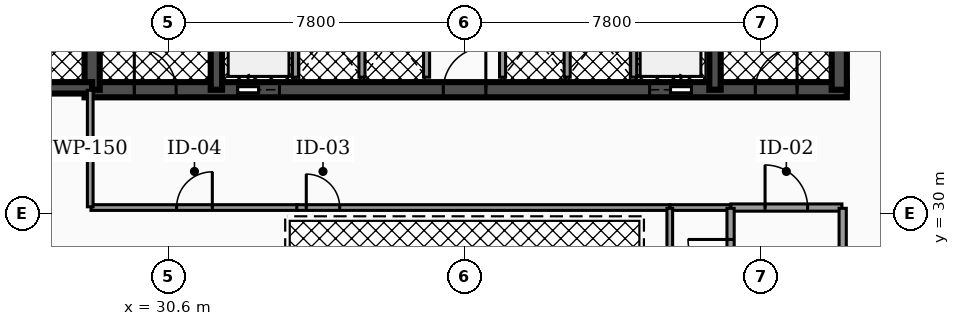
"""IFC4 building model, lengths in metres.
Left out: names, types, materials, properties, quantities, classifications, styles, units other than length and angle.
Written with IfcOpenShell. Run it as: python <this file> out.ifc"""

import sys

from ifc_helpers import new_model, si_unit, direction, frame, frame_2d, origin, place, context, subcontext, project, spatial, rectangle, extrude, element, fill, save


model = new_model("IFC4")
c1 = context("Model", 3, precision=1e-05, world=origin(), true_north=direction((0.0, 1.0)))
c2 = subcontext(c1, "Body", "Model", "MODEL_VIEW")
j1 = project(units=[si_unit("LENGTHUNIT", "METRE"), si_unit("PLANEANGLEUNIT", "RADIAN")], contexts=[c1])
p1 = place(None, origin())
s1 = spatial("IfcSite", under=j1, at=p1, CompositionType="ELEMENT")
p2 = place(p1, origin())
s2 = spatial("IfcBuilding", under=s1, at=p2, CompositionType="ELEMENT")
p3 = place(p2, frame((0.0, 0.0, 100.98)))
s3 = spatial("IfcBuildingStorey", under=s2, at=p3, CompositionType="ELEMENT", Elevation=100.98)
p4 = place(p3, frame((28.4, 33.25, 0.0), z_axis=(0.0, 0.0, 1.0), x_axis=(1.0, 0.0, 0.0)))
e1 = element("IfcWall", 1, at=p4, inside=s3, PredefinedType="SHEAR", context=c2, shape_type="SweptSolid", body=[
    extrude(rectangle(XDim=20.06, YDim=0.4, at=frame_2d((10.03, 0.0))), origin(), (0.0, 0.0, 1.0), 3.82),
])
p5 = place(p4, frame((4.03, 0.0, 0.0)))
e2 = element("IfcOpeningElement", 2, at=p5, cuts=e1, PredefinedType="OPENING", context=c2, shape_type="SweptSolid", body=[
    extrude(rectangle(XDim=1.1, YDim=2.15, at=frame_2d((0.55, 1.075))), frame((0.0, 0.21, 0.0), z_axis=(0.0, -1.0, 0.0), x_axis=(1.0, 0.0, 0.0)), (0.0, 0.0, 1.0), 0.42),
])
p6 = place(p4, frame((14.87, 0.0, 0.0)))
e3 = element("IfcOpeningElement", 3, at=p6, cuts=e1, PredefinedType="OPENING", context=c2, shape_type="SweptSolid", body=[
    extrude(rectangle(XDim=1.1, YDim=2.15, at=frame_2d((0.55, 1.075))), frame((0.0, 0.21, 0.0), z_axis=(0.0, -1.0, 0.0), x_axis=(1.0, 0.0, 0.0)), (0.0, 0.0, 1.0), 0.42),
])
p7 = place(p4, frame((1.31, 0.0, 0.0)))
e4 = element("IfcOpeningElement", 4, at=p7, cuts=e1, PredefinedType="OPENING", context=c2, shape_type="SweptSolid", body=[
    extrude(rectangle(XDim=1.1, YDim=2.2, at=frame_2d((0.55, 1.1))), frame((0.0, 0.21, 0.0), z_axis=(0.0, -1.0, 0.0), x_axis=(1.0, 0.0, 0.0)), (0.0, 0.0, 1.0), 0.42),
])
p8 = place(p4, frame((9.44, 0.0, 0.0)))
e5 = element("IfcOpeningElement", 5, at=p8, cuts=e1, PredefinedType="OPENING", context=c2, shape_type="SweptSolid", body=[
    extrude(rectangle(XDim=1.12, YDim=2.05, at=frame_2d((0.56, 1.025))), frame((0.0, 0.21, 0.0), z_axis=(0.0, -1.0, 0.0), x_axis=(1.0, 0.0, 0.0)), (0.0, 0.0, 1.0), 0.42),
])
p9 = place(p4, frame((17.65, 0.0, 0.0)))
e6 = element("IfcOpeningElement", 6, at=p9, cuts=e1, PredefinedType="OPENING", context=c2, shape_type="SweptSolid", body=[
    extrude(rectangle(XDim=1.1, YDim=2.2, at=frame_2d((0.55, 1.1))), frame((0.0, 0.21, 0.0), z_axis=(0.0, -1.0, 0.0), x_axis=(1.0, 0.0, 0.0)), (0.0, 0.0, 1.0), 0.42),
])
p10 = place(p3, frame((28.6, 33.25, 0.0), z_axis=(0.0, 0.0, 1.0), x_axis=(0.0, 1.0, 0.0)))
e7 = element("IfcWall", 7, at=p10, inside=s3, PredefinedType="SHEAR", context=c2, shape_type="SweptSolid", body=[
    extrude(rectangle(XDim=10.2, YDim=0.4, at=frame_2d((5.1, 0.0))), origin(), (0.0, 0.0, 1.0), 3.82),
])
for number, where, z_axis, x_axis in (
    (8, (31.87, 33.25, 0.0), (0.0, 0.0, 1.0), (0.0, 1.0, 0.0)),
    (9, (44.99, 33.25, 0.0), (0.0, 0.0, 1.0), (0.0, 1.0, 0.0)),
):
    element("IfcWall", number, at=place(p3, frame(where, z_axis=z_axis, x_axis=x_axis)), inside=s3, PredefinedType="SHEAR", context=c2, shape_type="SweptSolid", body=[
        extrude(rectangle(XDim=10.2, YDim=0.3, at=frame_2d((5.1, 0.0))), origin(), (0.0, 0.0, 1.0), 3.82),
    ])
p11 = place(p3, frame((48.26, 33.25, 0.0), z_axis=(0.0, 0.0, 1.0), x_axis=(0.0, 1.0, 0.0)))
e10 = element("IfcWall", 10, at=p11, inside=s3, PredefinedType="SHEAR", context=c2, shape_type="SweptSolid", body=[
    extrude(rectangle(XDim=10.2, YDim=0.4, at=frame_2d((5.1, 0.0))), origin(), (0.0, 0.0, 1.0), 3.82),
])
p12 = place(p3, frame((25.08, 33.3, 0.0), z_axis=(0.0, 0.0, 1.0), x_axis=(1.0, 0.0, 0.0)))
e11 = element("IfcWall", 11, at=p12, inside=s3, PredefinedType="SHEAR", context=c2, shape_type="SweptSolid", body=[
    extrude(rectangle(XDim=3.52, YDim=0.3, at=frame_2d((1.76, 0.0))), origin(), (0.0, 0.0, 1.0), 3.82),
])
p13 = place(p12, frame((1.335, 0.0, 0.0)))
e12 = element("IfcOpeningElement", 12, at=p13, cuts=e11, PredefinedType="OPENING", context=c2, shape_type="SweptSolid", body=[
    extrude(rectangle(XDim=0.95, YDim=2.2, at=frame_2d((0.475, 1.1))), frame((0.0, 0.16, 0.0), z_axis=(0.0, -1.0, 0.0), x_axis=(1.0, 0.0, 0.0)), (0.0, 0.0, 1.0), 0.32),
])
for number, where, z_axis, x_axis in (
    (13, (33.95, 33.58, 0.0), (0.0, 0.0, 1.0), (0.0, 1.0, 0.0)),
    (14, (42.85, 33.58, 0.0), (0.0, 0.0, 1.0), (0.0, 1.0, 0.0)),
):
    element("IfcWall", number, at=place(p3, frame(where, z_axis=z_axis, x_axis=x_axis)), inside=s3, PredefinedType="SOLIDWALL", context=c2, shape_type="SweptSolid", body=[
        extrude(rectangle(XDim=2.45, YDim=0.16, at=frame_2d((1.225, 0.0))), origin(), (0.0, 0.0, 1.0), 2.792),
    ])
for number, where, z_axis, x_axis in (
    (15, (35.7, 33.58, 0.0), (0.0, 0.0, 1.0), (0.0, 1.0, 0.0)),
    (16, (37.4, 33.58, 0.0), (0.0, 0.0, 1.0), (0.0, 1.0, 0.0)),
    (17, (39.4, 33.58, 0.0), (0.0, 0.0, 1.0), (0.0, 1.0, 0.0)),
    (18, (41.1, 33.58, 0.0), (0.0, 0.0, 1.0), (0.0, 1.0, 0.0)),
):
    element("IfcWall", number, at=place(p3, frame(where, z_axis=z_axis, x_axis=x_axis)), inside=s3, PredefinedType="SOLIDWALL", context=c2, shape_type="SweptSolid", body=[
        extrude(rectangle(XDim=2.25, YDim=0.16, at=frame_2d((1.125, 0.0))), origin(), (0.0, 0.0, 1.0), 2.792),
    ])
p14 = place(p3, frame((45.405, 30.15, 0.0), z_axis=(0.0, 0.0, 1.0), x_axis=(1.0, 0.0, 0.0)))
e19 = element("IfcWall", 19, at=p14, inside=s3, PredefinedType="PARTITIONING", context=c2, shape_type="SweptSolid", body=[
    extrude(rectangle(XDim=2.925, YDim=0.19, at=frame_2d((1.462, 0.0))), origin(), (0.0, 0.0, 1.0), 2.777),
])
p15 = place(p14, frame((0.903, 0.0, 0.0)))
e20 = element("IfcOpeningElement", 20, at=p15, cuts=e19, PredefinedType="OPENING", context=c2, shape_type="SweptSolid", body=[
    extrude(rectangle(XDim=1.12, YDim=2.05, at=frame_2d((0.56, 1.025))), frame((0.0, 0.105, 0.0), z_axis=(0.0, -1.0, 0.0), x_axis=(1.0, 0.0, 0.0)), (0.0, 0.0, 1.0), 0.21),
])
p16 = place(p3, frame((43.805, 30.15, 0.0), z_axis=(0.0, 0.0, 1.0), x_axis=(1.0, 0.0, 0.0)))
e21 = element("IfcWall", 21, at=p16, inside=s3, PredefinedType="PARTITIONING", context=c2, shape_type="SweptSolid", body=[
    extrude(rectangle(XDim=1.59, YDim=0.15, at=frame_2d((0.795, 0.0))), origin(), (0.0, 0.0, 1.0), 2.777),
])
p17 = place(p3, frame((28.57, 30.15, 0.0), z_axis=(0.0, 0.0, 1.0), x_axis=(1.0, 0.0, 0.0)))
e22 = element("IfcWall", 22, at=p17, inside=s3, PredefinedType="PARTITIONING", context=c2, shape_type="SweptSolid", body=[
    extrude(rectangle(XDim=5.445, YDim=0.15, at=frame_2d((2.722, 0.0))), origin(), (0.0, 0.0, 1.0), 2.777),
])
p18 = place(p17, frame((2.252, 0.0, 0.0)))
e23 = element("IfcOpeningElement", 23, at=p18, cuts=e22, PredefinedType="OPENING", context=c2, shape_type="SweptSolid", body=[
    extrude(rectangle(XDim=0.94, YDim=2.05, at=frame_2d((0.47, 1.025))), frame((0.0, 0.085, 0.0), z_axis=(0.0, -1.0, 0.0), x_axis=(1.0, 0.0, 0.0)), (0.0, 0.0, 1.0), 0.17),
])
p19 = place(p3, frame((28.55, 30.17, 0.0), z_axis=(0.0, 0.0, 1.0), x_axis=(0.0, 1.0, 0.0)))
e24 = element("IfcWall", 24, at=p19, inside=s3, PredefinedType="PARTITIONING", context=c2, shape_type="SweptSolid", body=[
    extrude(rectangle(XDim=3.065, YDim=0.15, at=frame_2d((1.533, 0.0))), origin(), (0.0, 0.0, 1.0), 2.777),
])
p20 = place(p3, frame((33.985, 30.15, 0.0), z_axis=(0.0, 0.0, 1.0), x_axis=(1.0, 0.0, 0.0)))
e25 = element("IfcWall", 25, at=p20, inside=s3, PredefinedType="PARTITIONING", context=c2, shape_type="SweptSolid", body=[
    extrude(rectangle(XDim=9.81, YDim=0.15, at=frame_2d((4.905, 0.0))), origin(), (0.0, 0.0, 1.0), 2.777),
])
p21 = place(p20, frame((0.25, 0.0, 0.0)))
e26 = element("IfcOpeningElement", 26, at=p21, cuts=e25, PredefinedType="OPENING", context=c2, shape_type="SweptSolid", body=[
    extrude(rectangle(XDim=0.88, YDim=2.05, at=frame_2d((0.44, 1.025))), frame((0.0, 0.085, 0.0), z_axis=(0.0, -1.0, 0.0), x_axis=(1.0, 0.0, 0.0)), (0.0, 0.0, 1.0), 0.17),
])
p22 = place(p3, frame((45.4, 27.37, 0.0), z_axis=(0.0, 0.0, 1.0), x_axis=(0.0, 1.0, 0.0)))
e27 = element("IfcWall", 27, at=p22, inside=s3, PredefinedType="PARTITIONING", context=c2, shape_type="SweptSolid", body=[
    extrude(rectangle(XDim=2.76, YDim=0.19, at=frame_2d((1.38, 0.0))), origin(), (0.0, 0.0, 1.0), 2.777),
])
p23 = place(p22, frame((0.82, 0.0, 0.0)))
e28 = element("IfcOpeningElement", 28, at=p23, cuts=e27, PredefinedType="OPENING", context=c2, shape_type="SweptSolid", body=[
    extrude(rectangle(XDim=1.12, YDim=2.05, at=frame_2d((0.56, 1.025))), frame((0.0, 0.105, 0.0), z_axis=(0.0, -1.0, 0.0), x_axis=(1.0, 0.0, 0.0)), (0.0, 0.0, 1.0), 0.21),
])
p24 = place(p3, frame((48.35, 27.37, 0.0), z_axis=(0.0, 0.0, 1.0), x_axis=(0.0, 1.0, 0.0)))
e29 = element("IfcWall", 29, at=p24, inside=s3, PredefinedType="PARTITIONING", context=c2, shape_type="SweptSolid", body=[
    extrude(rectangle(XDim=2.76, YDim=0.19, at=frame_2d((1.38, 0.0))), origin(), (0.0, 0.0, 1.0), 2.777),
])
p25 = place(p3, frame((43.8, 23.62, 0.0), z_axis=(0.0, 0.0, 1.0), x_axis=(0.0, 1.0, 0.0)))
e30 = element("IfcWall", 30, at=p25, inside=s3, PredefinedType="PARTITIONING", context=c2, shape_type="SweptSolid", body=[
    extrude(rectangle(XDim=6.51, YDim=0.15, at=frame_2d((3.255, 0.0))), origin(), (0.0, 0.0, 1.0), 2.777),
])
p26 = place(p5, origin())
e31 = element("IfcDoor", 31, at=p26, inside=s3, OperationType="SLIDING_TO_LEFT", PredefinedType="DOOR", context=c2, shape_type="SweptSolid", body=[
    extrude(rectangle(XDim=1.1, YDim=2.15, at=frame_2d((0.55, 1.075))), frame((0.0, 0.025, 0.0), z_axis=(0.0, -1.0, 0.0), x_axis=(1.0, 0.0, 0.0)), (0.0, 0.0, 1.0), 0.05),
])
fill(e2, e31)
p27 = place(p6, origin())
e32 = element("IfcDoor", 32, at=p27, inside=s3, OperationType="SLIDING_TO_RIGHT", PredefinedType="DOOR", context=c2, shape_type="SweptSolid", body=[
    extrude(rectangle(XDim=1.1, YDim=2.15, at=frame_2d((0.55, 1.075))), frame((0.0, 0.025, 0.0), z_axis=(0.0, -1.0, 0.0), x_axis=(1.0, 0.0, 0.0)), (0.0, 0.0, 1.0), 0.05),
])
fill(e3, e32)
p28 = place(p7, origin())
e33 = element("IfcDoor", 33, at=p28, inside=s3, OperationType="SINGLE_SWING_LEFT", PredefinedType="DOOR", context=c2, shape_type="SweptSolid", body=[
    extrude(rectangle(XDim=1.1, YDim=2.2, at=frame_2d((0.55, 1.1))), frame((0.0, 0.025, 0.0), z_axis=(0.0, -1.0, 0.0), x_axis=(1.0, 0.0, 0.0)), (0.0, 0.0, 1.0), 0.05),
])
fill(e4, e33)
p29 = place(p8, origin())
e34 = element("IfcDoor", 34, at=p29, inside=s3, OperationType="SINGLE_SWING_RIGHT", PredefinedType="DOOR", context=c2, shape_type="SweptSolid", body=[
    extrude(rectangle(XDim=1.12, YDim=2.05, at=frame_2d((0.56, 1.025))), frame((0.0, 0.025, 0.0), z_axis=(0.0, -1.0, 0.0), x_axis=(1.0, 0.0, 0.0)), (0.0, 0.0, 1.0), 0.05),
])
fill(e5, e34)
p30 = place(p9, origin())
e35 = element("IfcDoor", 35, at=p30, inside=s3, OperationType="SINGLE_SWING_RIGHT", PredefinedType="DOOR", context=c2, shape_type="SweptSolid", body=[
    extrude(rectangle(XDim=1.1, YDim=2.2, at=frame_2d((0.55, 1.1))), frame((0.0, 0.025, 0.0), z_axis=(0.0, -1.0, 0.0), x_axis=(1.0, 0.0, 0.0)), (0.0, 0.0, 1.0), 0.05),
])
fill(e6, e35)
p31 = place(p15, origin())
e36 = element("IfcDoor", 36, at=p31, inside=s3, OperationType="SINGLE_SWING_LEFT", PredefinedType="DOOR", context=c2, shape_type="SweptSolid", body=[
    extrude(rectangle(XDim=1.12, YDim=2.05, at=frame_2d((0.56, 1.025))), frame((0.0, 0.025, 0.0), z_axis=(0.0, -1.0, 0.0), x_axis=(1.0, 0.0, 0.0)), (0.0, 0.0, 1.0), 0.05),
])
fill(e20, e36)
p32 = place(p18, origin())
e37 = element("IfcDoor", 37, at=p32, inside=s3, OperationType="SINGLE_SWING_RIGHT", PredefinedType="DOOR", context=c2, shape_type="SweptSolid", body=[
    extrude(rectangle(XDim=0.94, YDim=2.05, at=frame_2d((0.47, 1.025))), frame((0.0, 0.025, 0.0), z_axis=(0.0, -1.0, 0.0), x_axis=(1.0, 0.0, 0.0)), (0.0, 0.0, 1.0), 0.05),
])
fill(e23, e37)
p33 = place(p21, origin())
e38 = element("IfcDoor", 38, at=p33, inside=s3, OperationType="SINGLE_SWING_LEFT", PredefinedType="DOOR", context=c2, shape_type="SweptSolid", body=[
    extrude(rectangle(XDim=0.88, YDim=2.05, at=frame_2d((0.44, 1.025))), frame((0.0, 0.025, 0.0), z_axis=(0.0, -1.0, 0.0), x_axis=(1.0, 0.0, 0.0)), (0.0, 0.0, 1.0), 0.05),
])
fill(e26, e38)
p34 = place(p23, origin())
e39 = element("IfcDoor", 39, at=p34, inside=s3, OperationType="SINGLE_SWING_RIGHT", PredefinedType="DOOR", context=c2, shape_type="SweptSolid", body=[
    extrude(rectangle(XDim=1.12, YDim=2.05, at=frame_2d((0.56, 1.025))), frame((0.0, 0.025, 0.0), z_axis=(0.0, -1.0, 0.0), x_axis=(1.0, 0.0, 0.0)), (0.0, 0.0, 1.0), 0.05),
])
fill(e28, e39)
save(model, sys.argv[1])
